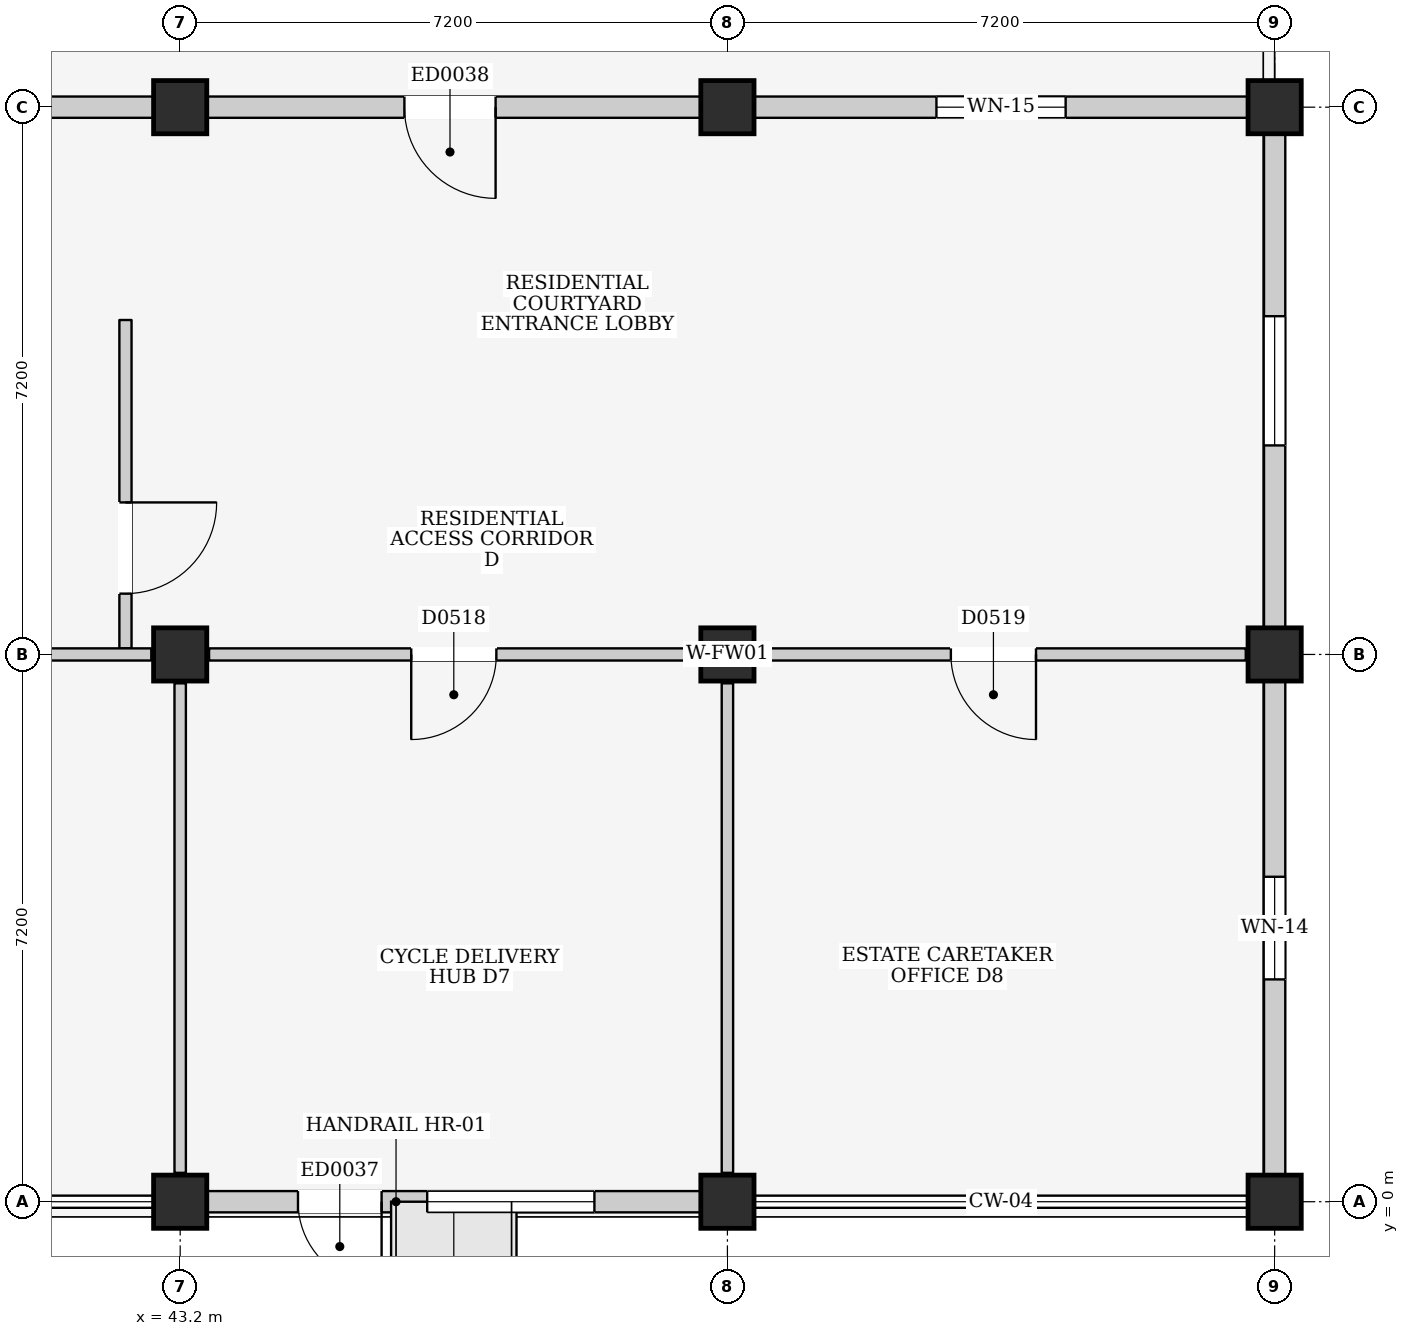
"""IFC4 building model, lengths in metres.
Left out: names, types, materials, properties, quantities, classifications, styles, units other than length and angle.
Written with IfcOpenShell. Run it as: python <this file> out.ifc"""

import sys

from ifc_helpers import new_model, si_unit, direction, frame, frame_2d, origin, origin_2d, place, context, subcontext, project, spatial, rectangle, extrude, element, fill, save


model = new_model("IFC4")
c1 = context("Model", 3, precision=1e-05, world=origin(), true_north=direction((0.0, 1.0)))
c2 = subcontext(c1, "Body", "Model", "MODEL_VIEW")
j1 = project(units=[si_unit("LENGTHUNIT", "METRE"), si_unit("PLANEANGLEUNIT", "RADIAN")], contexts=[c1])
p1 = place(None, origin())
s1 = spatial("IfcSite", under=j1, at=p1, CompositionType="ELEMENT")
p2 = place(p1, origin())
s2 = spatial("IfcBuilding", under=s1, at=p2, CompositionType="ELEMENT")
p3 = place(p2, origin())
s3 = spatial("IfcBuildingStorey", under=s2, at=p3, CompositionType="ELEMENT", Elevation=0.0)
for number, where, z_axis, x_axis in (
    (1, (43.2, 0.0, 0.0), (0.0, 0.0, 1.0), (1.0, 0.0, 0.0)),
    (2, (43.2, 7.2, 0.0), (0.0, 0.0, 1.0), (1.0, 0.0, 0.0)),
    (3, (43.2, 14.4, 0.0), (0.0, 0.0, 1.0), (1.0, 0.0, 0.0)),
    (4, (50.4, 0.0, 0.0), (0.0, 0.0, 1.0), (1.0, 0.0, 0.0)),
    (5, (50.4, 7.2, 0.0), (0.0, 0.0, 1.0), (1.0, 0.0, 0.0)),
    (6, (50.4, 14.4, 0.0), (0.0, 0.0, 1.0), (1.0, 0.0, 0.0)),
    (7, (57.6, 0.0, 0.0), (0.0, 0.0, 1.0), (1.0, 0.0, 0.0)),
    (8, (57.6, 7.2, 0.0), (0.0, 0.0, 1.0), (1.0, 0.0, 0.0)),
    (9, (57.6, 14.4, 0.0), (0.0, 0.0, 1.0), (1.0, 0.0, 0.0)),
):
    element("IfcColumn", number, at=place(p3, frame(where, z_axis=z_axis, x_axis=x_axis)), inside=s3, PredefinedType="COLUMN", context=c2, shape_type="SweptSolid", body=[
        extrude(rectangle(XDim=0.7, YDim=0.7, at=origin_2d()), origin(), (0.0, 0.0, 1.0), 4.5),
    ])
p4 = place(p3, frame((36.35, 14.4, 0.0), z_axis=(0.0, 0.0, 1.0), x_axis=(1.0, 0.0, 0.0)))
e10 = element("IfcWall", 10, at=p4, inside=s3, PredefinedType="ELEMENTEDWALL", context=c2, shape_type="SweptSolid", body=[
    extrude(rectangle(XDim=6.5, YDim=0.28, at=frame_2d((3.25, 0.0))), origin(), (0.0, 0.0, 1.0), 3.435),
])
p5 = place(p4, frame((2.55, 0.0, 0.95)))
e11 = element("IfcOpeningElement", 11, at=p5, cuts=e10, PredefinedType="OPENING", context=c2, shape_type="SweptSolid", body=[
    extrude(rectangle(XDim=1.4, YDim=1.2, at=frame_2d((0.7, 0.6))), frame((0.0, 0.155, 0.0), z_axis=(0.0, -1.0, 0.0), x_axis=(1.0, 0.0, 0.0)), (0.0, 0.0, 1.0), 0.31),
])
p6 = place(p3, frame((43.55, 0.0, 0.0), z_axis=(0.0, 0.0, 1.0), x_axis=(1.0, 0.0, 0.0)))
e12 = element("IfcWall", 12, at=p6, inside=s3, PredefinedType="ELEMENTEDWALL", context=c2, shape_type="SweptSolid", body=[
    extrude(rectangle(XDim=6.5, YDim=0.28, at=frame_2d((3.25, 0.0))), origin(), (0.0, 0.0, 1.0), 3.665),
])
p7 = place(p6, frame((1.2, 0.0, 0.0)))
e13 = element("IfcOpeningElement", 13, at=p7, cuts=e12, PredefinedType="OPENING", context=c2, shape_type="SweptSolid", body=[
    extrude(rectangle(XDim=1.1, YDim=2.2, at=frame_2d((0.55, 1.1))), frame((0.0, 0.155, 0.0), z_axis=(0.0, -1.0, 0.0), x_axis=(1.0, 0.0, 0.0)), (0.0, 0.0, 1.0), 0.31),
])
p8 = place(p6, frame((2.9, 0.0, 0.85)))
e14 = element("IfcOpeningElement", 14, at=p8, cuts=e12, PredefinedType="OPENING", context=c2, shape_type="SweptSolid", body=[
    extrude(rectangle(XDim=2.2, YDim=1.8, at=frame_2d((1.1, 0.9))), frame((0.0, 0.155, 0.0), z_axis=(0.0, -1.0, 0.0), x_axis=(1.0, 0.0, 0.0)), (0.0, 0.0, 1.0), 0.31),
])
p9 = place(p3, frame((43.55, 14.4, 0.0), z_axis=(0.0, 0.0, 1.0), x_axis=(1.0, 0.0, 0.0)))
e15 = element("IfcWall", 15, at=p9, inside=s3, PredefinedType="ELEMENTEDWALL", context=c2, shape_type="SweptSolid", body=[
    extrude(rectangle(XDim=6.5, YDim=0.28, at=frame_2d((3.25, 0.0))), origin(), (0.0, 0.0, 1.0), 3.435),
])
p10 = place(p9, frame((2.6, 0.0, 0.0)))
e16 = element("IfcOpeningElement", 16, at=p10, cuts=e15, PredefinedType="OPENING", context=c2, shape_type="SweptSolid", body=[
    extrude(rectangle(XDim=1.2, YDim=2.15, at=frame_2d((0.6, 1.075))), frame((0.0, 0.155, 0.0), z_axis=(0.0, -1.0, 0.0), x_axis=(1.0, 0.0, 0.0)), (0.0, 0.0, 1.0), 0.31),
])
p11 = place(p3, frame((57.6, 0.35, 0.0), z_axis=(0.0, 0.0, 1.0), x_axis=(0.0, 1.0, 0.0)))
e17 = element("IfcWall", 17, at=p11, inside=s3, PredefinedType="ELEMENTEDWALL", context=c2, shape_type="SweptSolid", body=[
    extrude(rectangle(XDim=6.5, YDim=0.28, at=frame_2d((3.25, 0.0))), origin(), (0.0, 0.0, 1.0), 3.435),
])
p12 = place(p11, frame((2.575, 0.0, 0.95)))
e18 = element("IfcOpeningElement", 18, at=p12, cuts=e17, PredefinedType="OPENING", context=c2, shape_type="SweptSolid", body=[
    extrude(rectangle(XDim=1.35, YDim=1.5, at=frame_2d((0.675, 0.75))), frame((0.0, 0.155, 0.0), z_axis=(0.0, -1.0, 0.0), x_axis=(1.0, 0.0, 0.0)), (0.0, 0.0, 1.0), 0.31),
])
p13 = place(p3, frame((50.75, 14.4, 0.0), z_axis=(0.0, 0.0, 1.0), x_axis=(1.0, 0.0, 0.0)))
e19 = element("IfcWall", 19, at=p13, inside=s3, PredefinedType="ELEMENTEDWALL", context=c2, shape_type="SweptSolid", body=[
    extrude(rectangle(XDim=6.5, YDim=0.28, at=frame_2d((3.25, 0.0))), origin(), (0.0, 0.0, 1.0), 3.435),
])
p14 = place(p13, frame((2.4, 0.0, 0.95)))
e20 = element("IfcOpeningElement", 20, at=p14, cuts=e19, PredefinedType="OPENING", context=c2, shape_type="SweptSolid", body=[
    extrude(rectangle(XDim=1.7, YDim=1.45, at=frame_2d((0.85, 0.725))), frame((0.0, 0.155, 0.0), z_axis=(0.0, -1.0, 0.0), x_axis=(1.0, 0.0, 0.0)), (0.0, 0.0, 1.0), 0.31),
])
p15 = place(p3, frame((57.6, 7.55, 0.0), z_axis=(0.0, 0.0, 1.0), x_axis=(0.0, 1.0, 0.0)))
e21 = element("IfcWall", 21, at=p15, inside=s3, PredefinedType="ELEMENTEDWALL", context=c2, shape_type="SweptSolid", body=[
    extrude(rectangle(XDim=6.5, YDim=0.28, at=frame_2d((3.25, 0.0))), origin(), (0.0, 0.0, 1.0), 3.435),
])
p16 = place(p15, frame((2.4, 0.0, 0.95)))
e22 = element("IfcOpeningElement", 22, at=p16, cuts=e21, PredefinedType="OPENING", context=c2, shape_type="SweptSolid", body=[
    extrude(rectangle(XDim=1.7, YDim=1.45, at=frame_2d((0.85, 0.725))), frame((0.0, 0.155, 0.0), z_axis=(0.0, -1.0, 0.0), x_axis=(1.0, 0.0, 0.0)), (0.0, 0.0, 1.0), 0.31),
])
p17 = place(p3, frame((42.48, 7.28, 0.0), z_axis=(0.0, 0.0, 1.0), x_axis=(0.0, 1.0, 0.0)))
e23 = element("IfcWall", 23, at=p17, inside=s3, PredefinedType="PARTITIONING", context=c2, shape_type="SweptSolid", body=[
    extrude(rectangle(XDim=4.32, YDim=0.16, at=frame_2d((2.16, 0.0))), origin(), (0.0, 0.0, 1.0), 4.2),
])
p18 = place(p17, frame((0.72, 0.0, 0.0)))
e24 = element("IfcOpeningElement", 24, at=p18, cuts=e23, PredefinedType="OPENING", context=c2, shape_type="SweptSolid", body=[
    extrude(rectangle(XDim=1.2, YDim=2.2, at=frame_2d((0.6, 1.1))), frame((0.0, 0.095, 0.0), z_axis=(0.0, -1.0, 0.0), x_axis=(1.0, 0.0, 0.0)), (0.0, 0.0, 1.0), 0.19),
])
p19 = place(p3, frame((36.38, 7.2, 0.0), z_axis=(0.0, 0.0, 1.0), x_axis=(1.0, 0.0, 0.0)))
e25 = element("IfcWall", 25, at=p19, inside=s3, PredefinedType="PARTITIONING", context=c2, shape_type="SweptSolid", body=[
    extrude(rectangle(XDim=6.44, YDim=0.16, at=frame_2d((3.22, 0.0))), origin(), (0.0, 0.0, 1.0), 3.435),
])
p20 = place(p19, frame((2.695, 0.0, 0.0)))
e26 = element("IfcOpeningElement", 26, at=p20, cuts=e25, PredefinedType="OPENING", context=c2, shape_type="SweptSolid", body=[
    extrude(rectangle(XDim=1.05, YDim=2.15, at=frame_2d((0.525, 1.075))), frame((0.0, 0.095, 0.0), z_axis=(0.0, -1.0, 0.0), x_axis=(1.0, 0.0, 0.0)), (0.0, 0.0, 1.0), 0.19),
])
p21 = place(p3, frame((43.2, 0.38, 0.0), z_axis=(0.0, 0.0, 1.0), x_axis=(0.0, 1.0, 0.0)))
e27 = element("IfcWall", 27, at=p21, inside=s3, PredefinedType="PARTITIONING", context=c2, shape_type="SweptSolid", body=[
    extrude(rectangle(XDim=6.44, YDim=0.15, at=frame_2d((3.22, 0.0))), origin(), (0.0, 0.0, 1.0), 3.435),
])
p22 = place(p3, frame((43.58, 7.2, 0.0), z_axis=(0.0, 0.0, 1.0), x_axis=(1.0, 0.0, 0.0)))
e28 = element("IfcWall", 28, at=p22, inside=s3, PredefinedType="PARTITIONING", context=c2, shape_type="SweptSolid", body=[
    extrude(rectangle(XDim=6.44, YDim=0.16, at=frame_2d((3.22, 0.0))), origin(), (0.0, 0.0, 1.0), 3.435),
])
p23 = place(p22, frame((2.66, 0.0, 0.0)))
e29 = element("IfcOpeningElement", 29, at=p23, cuts=e28, PredefinedType="OPENING", context=c2, shape_type="SweptSolid", body=[
    extrude(rectangle(XDim=1.12, YDim=2.2, at=frame_2d((0.56, 1.1))), frame((0.0, 0.095, 0.0), z_axis=(0.0, -1.0, 0.0), x_axis=(1.0, 0.0, 0.0)), (0.0, 0.0, 1.0), 0.19),
])
p24 = place(p3, frame((50.4, 0.38, 0.0), z_axis=(0.0, 0.0, 1.0), x_axis=(0.0, 1.0, 0.0)))
e30 = element("IfcWall", 30, at=p24, inside=s3, PredefinedType="PARTITIONING", context=c2, shape_type="SweptSolid", body=[
    extrude(rectangle(XDim=6.44, YDim=0.15, at=frame_2d((3.22, 0.0))), origin(), (0.0, 0.0, 1.0), 3.435),
])
p25 = place(p3, frame((50.78, 7.2, 0.0), z_axis=(0.0, 0.0, 1.0), x_axis=(1.0, 0.0, 0.0)))
e31 = element("IfcWall", 31, at=p25, inside=s3, PredefinedType="PARTITIONING", context=c2, shape_type="SweptSolid", body=[
    extrude(rectangle(XDim=6.44, YDim=0.16, at=frame_2d((3.22, 0.0))), origin(), (0.0, 0.0, 1.0), 3.435),
])
p26 = place(p25, frame((2.56, 0.0, 0.0)))
e32 = element("IfcOpeningElement", 32, at=p26, cuts=e31, PredefinedType="OPENING", context=c2, shape_type="SweptSolid", body=[
    extrude(rectangle(XDim=1.12, YDim=2.2, at=frame_2d((0.56, 1.1))), frame((0.0, 0.095, 0.0), z_axis=(0.0, -1.0, 0.0), x_axis=(1.0, 0.0, 0.0)), (0.0, 0.0, 1.0), 0.19),
])
p27 = place(p7, frame((1.1, 0.0, 0.0), z_axis=(0.0, 0.0, 1.0), x_axis=(-1.0, 0.0, 0.0)))
e33 = element("IfcDoor", 33, at=p27, inside=s3, OperationType="SINGLE_SWING_LEFT", PredefinedType="DOOR", context=c2, shape_type="SweptSolid", body=[
    extrude(rectangle(XDim=1.1, YDim=2.2, at=frame_2d((0.55, 1.1))), frame((0.0, 0.025, 0.0), z_axis=(0.0, -1.0, 0.0), x_axis=(1.0, 0.0, 0.0)), (0.0, 0.0, 1.0), 0.05),
])
fill(e13, e33)
p28 = place(p8, origin())
e34 = element("IfcWindow", 34, at=p28, inside=s3, PartitioningType="TRIPLE_PANEL_VERTICAL", PredefinedType="WINDOW", context=c2, shape_type="SweptSolid", body=[
    extrude(rectangle(XDim=2.2, YDim=1.8, at=frame_2d((1.1, 0.9))), frame((0.0, 0.03, 0.0), z_axis=(0.0, -1.0, 0.0), x_axis=(1.0, 0.0, 0.0)), (0.0, 0.0, 1.0), 0.06),
])
fill(e14, e34)
p29 = place(p10, frame((1.2, 0.0, 0.0), z_axis=(0.0, 0.0, 1.0), x_axis=(-1.0, 0.0, 0.0)))
e35 = element("IfcDoor", 35, at=p29, inside=s3, OperationType="SINGLE_SWING_LEFT", PredefinedType="DOOR", context=c2, shape_type="SweptSolid", body=[
    extrude(rectangle(XDim=1.2, YDim=2.15, at=frame_2d((0.6, 1.075))), frame((0.0, 0.025, 0.0), z_axis=(0.0, -1.0, 0.0), x_axis=(1.0, 0.0, 0.0)), (0.0, 0.0, 1.0), 0.05),
])
fill(e16, e35)
p30 = place(p12, origin())
e36 = element("IfcWindow", 36, at=p30, inside=s3, PartitioningType="SINGLE_PANEL", PredefinedType="WINDOW", context=c2, shape_type="SweptSolid", body=[
    extrude(rectangle(XDim=1.35, YDim=1.5, at=frame_2d((0.675, 0.75))), frame((0.0, 0.03, 0.0), z_axis=(0.0, -1.0, 0.0), x_axis=(1.0, 0.0, 0.0)), (0.0, 0.0, 1.0), 0.06),
])
fill(e18, e36)
p31 = place(p14, origin())
e37 = element("IfcWindow", 37, at=p31, inside=s3, PartitioningType="DOUBLE_PANEL_VERTICAL", PredefinedType="WINDOW", context=c2, shape_type="SweptSolid", body=[
    extrude(rectangle(XDim=1.7, YDim=1.45, at=frame_2d((0.85, 0.725))), frame((0.0, 0.03, 0.0), z_axis=(0.0, -1.0, 0.0), x_axis=(1.0, 0.0, 0.0)), (0.0, 0.0, 1.0), 0.06),
])
fill(e20, e37)
p32 = place(p16, origin())
e38 = element("IfcWindow", 38, at=p32, inside=s3, PartitioningType="DOUBLE_PANEL_VERTICAL", PredefinedType="WINDOW", context=c2, shape_type="SweptSolid", body=[
    extrude(rectangle(XDim=1.7, YDim=1.45, at=frame_2d((0.85, 0.725))), frame((0.0, 0.03, 0.0), z_axis=(0.0, -1.0, 0.0), x_axis=(1.0, 0.0, 0.0)), (0.0, 0.0, 1.0), 0.06),
])
fill(e22, e38)
p33 = place(p18, frame((1.2, 0.0, 0.0), z_axis=(0.0, 0.0, 1.0), x_axis=(-1.0, 0.0, 0.0)))
e39 = element("IfcDoor", 39, at=p33, inside=s3, OperationType="SINGLE_SWING_LEFT", PredefinedType="DOOR", context=c2, shape_type="SweptSolid", body=[
    extrude(rectangle(XDim=1.2, YDim=2.2, at=frame_2d((0.6, 1.1))), frame((0.0, 0.025, 0.0), z_axis=(0.0, -1.0, 0.0), x_axis=(1.0, 0.0, 0.0)), (0.0, 0.0, 1.0), 0.05),
])
fill(e24, e39)
p34 = place(p23, frame((1.12, 0.0, 0.0), z_axis=(0.0, 0.0, 1.0), x_axis=(-1.0, 0.0, 0.0)))
e40 = element("IfcDoor", 40, at=p34, inside=s3, OperationType="SINGLE_SWING_RIGHT", PredefinedType="DOOR", context=c2, shape_type="SweptSolid", body=[
    extrude(rectangle(XDim=1.12, YDim=2.2, at=frame_2d((0.56, 1.1))), frame((0.0, 0.025, 0.0), z_axis=(0.0, -1.0, 0.0), x_axis=(1.0, 0.0, 0.0)), (0.0, 0.0, 1.0), 0.05),
])
fill(e29, e40)
p35 = place(p26, frame((1.12, 0.0, 0.0), z_axis=(0.0, 0.0, 1.0), x_axis=(-1.0, 0.0, 0.0)))
e41 = element("IfcDoor", 41, at=p35, inside=s3, OperationType="SINGLE_SWING_LEFT", PredefinedType="DOOR", context=c2, shape_type="SweptSolid", body=[
    extrude(rectangle(XDim=1.12, YDim=2.2, at=frame_2d((0.56, 1.1))), frame((0.0, 0.025, 0.0), z_axis=(0.0, -1.0, 0.0), x_axis=(1.0, 0.0, 0.0)), (0.0, 0.0, 1.0), 0.05),
])
fill(e32, e41)
save(model, sys.argv[1])
